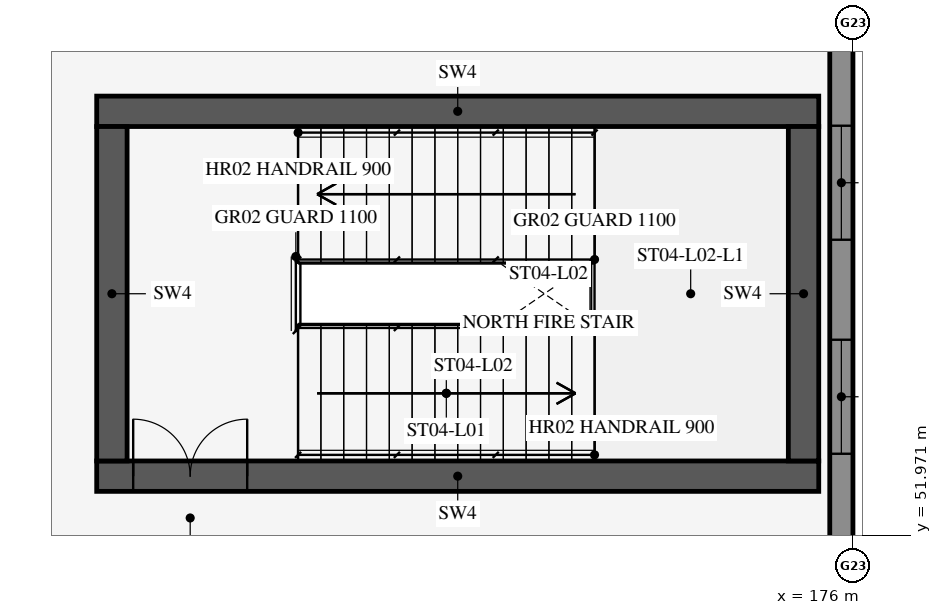
"""IFC4 building model, lengths in metres.
Left out: names, types, materials, properties, quantities, classifications, styles, units other than length and angle.
Written with IfcOpenShell. Run it as: python <this file> out.ifc"""

import sys

from ifc_helpers import new_model, si_unit, direction, frame, frame_2d, origin, place, context, subcontext, project, spatial, rectangle, extrude, element, fill, save


model = new_model("IFC4")
c1 = context("Model", 3, precision=1e-05, world=origin(), true_north=direction((0.0, 1.0)))
c2 = subcontext(c1, "Body", "Model", "MODEL_VIEW")
j1 = project(units=[si_unit("LENGTHUNIT", "METRE"), si_unit("PLANEANGLEUNIT", "RADIAN")], contexts=[c1])
p1 = place(None, origin())
s1 = spatial("IfcSite", under=j1, at=p1, CompositionType="ELEMENT")
p2 = place(p1, origin())
s2 = spatial("IfcBuilding", under=s1, at=p2, CompositionType="ELEMENT")
p3 = place(p2, frame((0.0, 0.0, 10.2)))
s3 = spatial("IfcBuildingStorey", under=s2, at=p3, CompositionType="ELEMENT", Elevation=10.2)
p4 = place(p3, frame((166.05, 52.75, 0.0), z_axis=(0.0, 0.0, 1.0), x_axis=(1.0, 0.0, 0.0)))
e1 = element("IfcWall", 1, at=p4, inside=s3, PredefinedType="SHEAR", context=c2, shape_type="SweptSolid", body=[
    extrude(rectangle(XDim=9.5, YDim=0.4, at=frame_2d((4.75, 0.0))), origin(), (0.0, 0.0, 1.0), 4.38),
])
p5 = place(p4, frame((0.48, 0.0, 0.0)))
e2 = element("IfcOpeningElement", 2, at=p5, cuts=e1, PredefinedType="OPENING", context=c2, shape_type="SweptSolid", body=[
    extrude(rectangle(XDim=1.5, YDim=2.3, at=frame_2d((0.75, 1.15))), frame((0.0, 0.212, 0.0), z_axis=(0.0, -1.0, 0.0), x_axis=(1.0, 0.0, 0.0)), (0.0, 0.0, 1.0), 0.424),
])
p6 = place(p3, frame((166.05, 57.55, 0.0), z_axis=(0.0, 0.0, 1.0), x_axis=(1.0, 0.0, 0.0)))
e3 = element("IfcWall", 3, at=p6, inside=s3, PredefinedType="SHEAR", context=c2, shape_type="SweptSolid", body=[
    extrude(rectangle(XDim=9.5, YDim=0.4, at=frame_2d((4.75, 0.0))), origin(), (0.0, 0.0, 1.0), 4.38),
])
for number, where, z_axis, x_axis in (
    (4, (166.25, 52.95, 0.0), (0.0, 0.0, 1.0), (0.0, 1.0, 0.0)),
    (5, (175.35, 52.95, 0.0), (0.0, 0.0, 1.0), (0.0, 1.0, 0.0)),
):
    element("IfcWall", number, at=place(p3, frame(where, z_axis=z_axis, x_axis=x_axis)), inside=s3, PredefinedType="SHEAR", context=c2, shape_type="SweptSolid", body=[
        extrude(rectangle(XDim=4.4, YDim=0.4, at=frame_2d((2.2, 0.0))), origin(), (0.0, 0.0, 1.0), 4.38),
    ])
p7 = place(p3, frame((175.847, 51.729, 0.0), z_axis=(0.0, 0.0, 1.0), x_axis=(0.0, 1.0, 0.0)))
e6 = element("IfcWall", 6, at=p7, inside=s3, PredefinedType="SOLIDWALL", context=c2, shape_type="SweptSolid", body=[
    extrude(rectangle(XDim=6.947, YDim=0.305, at=frame_2d((3.474, 0.0))), origin(), (0.0, 0.0, 1.0), 3.937),
])
p8 = place(p7, frame((1.316, 0.0, 0.95)))
e7 = element("IfcOpeningElement", 7, at=p8, cuts=e6, PredefinedType="OPENING", context=c2, shape_type="SweptSolid", body=[
    extrude(rectangle(XDim=1.5, YDim=1.2, at=frame_2d((0.75, 0.6))), frame((0.0, 0.165, 0.0), z_axis=(0.0, -1.0, 0.0), x_axis=(1.0, 0.0, 0.0)), (0.0, 0.0, 1.0), 0.329),
])
p9 = place(p7, frame((4.131, 0.0, 0.95)))
e8 = element("IfcOpeningElement", 8, at=p9, cuts=e6, PredefinedType="OPENING", context=c2, shape_type="SweptSolid", body=[
    extrude(rectangle(XDim=1.5, YDim=1.2, at=frame_2d((0.75, 0.6))), frame((0.0, 0.165, 0.0), z_axis=(0.0, -1.0, 0.0), x_axis=(1.0, 0.0, 0.0)), (0.0, 0.0, 1.0), 0.329),
])
p10 = place(p5, origin())
e9 = element("IfcDoor", 9, at=p10, inside=s3, OperationType="DOUBLE_DOOR_SINGLE_SWING", PredefinedType="DOOR", context=c2, shape_type="SweptSolid", body=[
    extrude(rectangle(XDim=1.5, YDim=2.3, at=frame_2d((0.75, 1.15))), frame((0.0, 0.025, 0.0), z_axis=(0.0, -1.0, 0.0), x_axis=(1.0, 0.0, 0.0)), (0.0, 0.0, 1.0), 0.05),
])
fill(e2, e9)
p11 = place(p8, origin())
e10 = element("IfcWindow", 10, at=p11, inside=s3, PartitioningType="SINGLE_PANEL", PredefinedType="WINDOW", context=c2, shape_type="SweptSolid", body=[
    extrude(rectangle(XDim=1.5, YDim=1.2, at=frame_2d((0.75, 0.6))), frame((0.0, 0.03, 0.0), z_axis=(0.0, -1.0, 0.0), x_axis=(1.0, 0.0, 0.0)), (0.0, 0.0, 1.0), 0.06),
])
fill(e7, e10)
p12 = place(p9, origin())
e11 = element("IfcWindow", 11, at=p12, inside=s3, PartitioningType="SINGLE_PANEL", PredefinedType="WINDOW", context=c2, shape_type="SweptSolid", body=[
    extrude(rectangle(XDim=1.5, YDim=1.2, at=frame_2d((0.75, 0.6))), frame((0.0, 0.03, 0.0), z_axis=(0.0, -1.0, 0.0), x_axis=(1.0, 0.0, 0.0)), (0.0, 0.0, 1.0), 0.06),
])
fill(e8, e11)
save(model, sys.argv[1])
